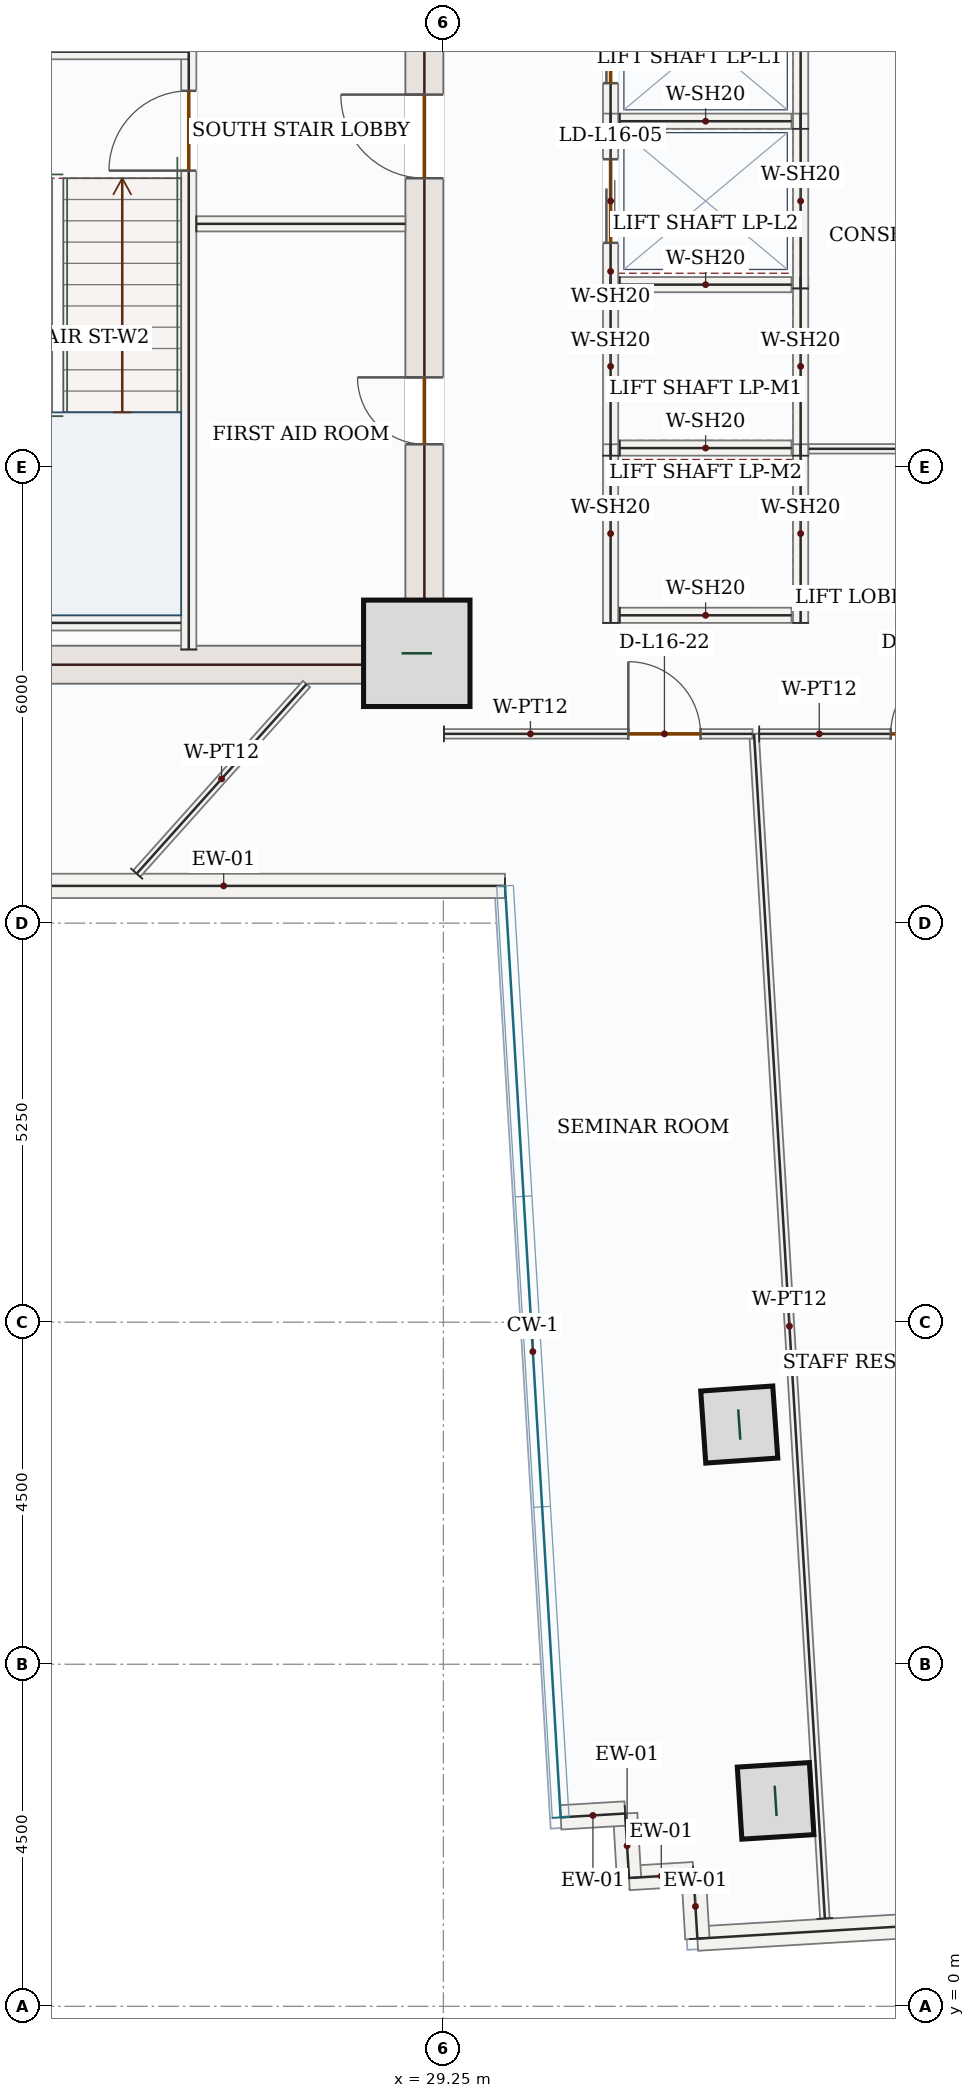
"""IFC4 building model, lengths in metres.
Left out: names, types, materials, properties, quantities, classifications, styles, units other than length and angle.
Written with IfcOpenShell. Run it as: python <this file> out.ifc"""

import sys

from ifc_helpers import new_model, si_unit, direction, frame, frame_2d, origin, origin_2d, place, context, subcontext, project, spatial, rectangle, hollow_rectangle, extrude, source, transform, mapped, element, fill, save


model = new_model("IFC4")
c1 = context("Model", 3, precision=1e-05, world=origin(), true_north=direction((0.0, 1.0)))
c2 = subcontext(c1, "Body", "Model", "MODEL_VIEW")
j1 = project(units=[si_unit("LENGTHUNIT", "METRE"), si_unit("PLANEANGLEUNIT", "RADIAN")], contexts=[c1])
p1 = place(None, origin())
s1 = spatial("IfcSite", under=j1, at=p1, CompositionType="ELEMENT")
p2 = place(p1, origin())
s2 = spatial("IfcBuilding", under=s1, at=p2, CompositionType="ELEMENT")
p3 = place(p2, frame((0.0, 0.0, 75.3)))
s3 = spatial("IfcBuildingStorey", under=s2, at=p3, CompositionType="ELEMENT", Elevation=75.3)
p4 = place(p3, frame((29.0, 17.4, 0.0), z_axis=(0.0, 0.0, 1.0), x_axis=(0.0, 1.0, 0.0)))
e1 = element("IfcWall", 1, at=p4, inside=s3, PredefinedType="SHEAR", context=c2, shape_type="SweptSolid", body=[
    extrude(rectangle(XDim=8.55, YDim=0.5, at=frame_2d((4.275, 0.0))), origin(), (0.0, 0.0, 1.0), 3.95),
])
p5 = place(p4, frame((6.65, 0.0, 0.0)))
e2 = element("IfcOpeningElement", 2, at=p5, cuts=e1, PredefinedType="OPENING", context=c2, shape_type="SweptSolid", body=[
    extrude(rectangle(XDim=1.1, YDim=2.2, at=frame_2d((0.55, 1.1))), frame((0.0, 0.26, 0.0), z_axis=(0.0, -1.0, 0.0), x_axis=(1.0, 0.0, 0.0)), (0.0, 0.0, 1.0), 0.52),
])
p6 = place(p4, frame((3.15, 0.0, 0.0)))
e3 = element("IfcOpeningElement", 3, at=p6, cuts=e1, PredefinedType="OPENING", context=c2, shape_type="SweptSolid", body=[
    extrude(rectangle(XDim=0.88, YDim=2.1, at=frame_2d((0.44, 1.05))), frame((0.0, 0.26, 0.0), z_axis=(0.0, -1.0, 0.0), x_axis=(1.0, 0.0, 0.0)), (0.0, 0.0, 1.0), 0.52),
])
m1 = source(origin(), c2, "Body", "SweptSolid", [
    extrude(rectangle(XDim=7.0, YDim=0.5, at=frame_2d((3.5, 0.0))), origin(), (0.0, 0.0, 1.0), 3.95),
])
p7 = place(p3, frame((21.75, 17.65, 0.0), z_axis=(0.0, 0.0, 1.0), x_axis=(1.0, 0.0, 0.0)))
e4 = element("IfcWall", 4, at=p7, inside=s3, PredefinedType="SHEAR", context=c2, shape_type="MappedRepresentation", body=[
    mapped(m1, transform((0.0, 0.0, 0.0), x_axis=(1.0, 0.0, 0.0), y_axis=(0.0, 1.0, 0.0), z_axis=(0.0, 0.0, 1.0), scale=1.0)),
])
m2 = source(origin(), c2, "Body", "SweptSolid", [
    extrude(rectangle(XDim=1.4, YDim=1.4, at=origin_2d()), origin(), (0.0, 0.0, 1.0), 4.2),
])
p8 = place(p3, frame((28.9, 17.8, 0.0), z_axis=(0.0, 0.0, 1.0), x_axis=(1.0, 0.0, 0.0)))
e5 = element("IfcColumn", 5, at=p8, inside=s3, PredefinedType="COLUMN", context=c2, shape_type="MappedRepresentation", body=[
    mapped(m2, transform((0.0, 0.0, 0.0), x_axis=(1.0, 0.0, 0.0), y_axis=(0.0, 1.0, 0.0), z_axis=(0.0, 0.0, 1.0), scale=1.0)),
])
m3 = source(origin(), c2, "Body", "SweptSolid", [
    extrude(hollow_rectangle(XDim=0.95, YDim=0.95, WallThickness=0.05, at=origin_2d()), origin(), (0.0, 0.0, 1.0), 4.2),
])
for number, where, z_axis, x_axis in (
    (6, (33.143, 7.654, 0.0), (0.0, 0.0, 1.0), (-0.07, 0.998, 0.0)),
    (7, (33.621, 2.703, 0.0), (0.0, 0.0, 1.0), (-0.063, 0.998, 0.0)),
):
    element("IfcColumn", number, at=place(p3, frame(where, z_axis=z_axis, x_axis=x_axis)), inside=s3, PredefinedType="COLUMN", context=c2, shape_type="MappedRepresentation", body=[
        mapped(m3, transform((0.0, 0.0, 0.0), x_axis=(1.0, 0.0, 0.0), y_axis=(0.0, 1.0, 0.0), z_axis=(0.0, 0.0, 1.0), scale=1.0)),
    ])
m4 = source(origin(), c2, "Body", "SweptSolid", [
    extrude(rectangle(XDim=9.92, YDim=0.32, at=frame_2d((4.96, 0.0))), origin(), (0.0, 0.0, 1.0), 3.95),
])
p9 = place(p3, frame((42.494, 1.482, 0.0), z_axis=(0.0, 0.0, 1.0), x_axis=(-0.998218942745, -0.059656871726, 0.0)))
e8 = element("IfcWall", 8, at=p9, inside=s3, PredefinedType="SOLIDWALL", context=c2, shape_type="MappedRepresentation", body=[
    mapped(m4, transform((0.0, 0.0, 0.0), x_axis=(1.0, 0.0, 0.0), y_axis=(0.0, 1.0, 0.0), z_axis=(0.0, 0.0, 1.0), scale=1.0)),
])
m5 = source(origin(), c2, "Body", "SweptSolid", [
    extrude(rectangle(XDim=0.85, YDim=0.32, at=frame_2d((0.425, 0.0))), origin(), (0.0, 0.0, 1.0), 3.95),
])
p10 = place(p3, frame((32.592, 0.89, 0.0), z_axis=(0.0, 0.0, 1.0), x_axis=(-0.059732049764, 0.998214447016, 0.0)))
e9 = element("IfcWall", 9, at=p10, inside=s3, PredefinedType="SOLIDWALL", context=c2, shape_type="MappedRepresentation", body=[
    mapped(m5, transform((0.0, 0.0, 0.0), x_axis=(1.0, 0.0, 0.0), y_axis=(0.0, 1.0, 0.0), z_axis=(0.0, 0.0, 1.0), scale=1.0)),
])
m6 = source(origin(), c2, "Body", "SweptSolid", [
    extrude(rectangle(XDim=0.85, YDim=0.32, at=frame_2d((0.425, 0.0))), origin(), (0.0, 0.0, 1.0), 3.95),
])
for number, where, z_axis, x_axis in (
    (10, (32.541, 1.739, 0.0), (0.0, 0.0, 1.0), (-0.998, -0.06, 0.0)),
    (11, (31.692, 1.688, 0.0), (0.0, 0.0, 1.0), (-0.06, 0.998, 0.0)),
    (12, (31.642, 2.536, 0.0), (0.0, 0.0, 1.0), (-0.998, -0.06, 0.0)),
):
    element("IfcWall", number, at=place(p3, frame(where, z_axis=z_axis, x_axis=x_axis)), inside=s3, PredefinedType="SOLIDWALL", context=c2, shape_type="MappedRepresentation", body=[
        mapped(m6, transform((0.0, 0.0, 0.0), x_axis=(1.0, 0.0, 0.0), y_axis=(0.0, 1.0, 0.0), z_axis=(0.0, 0.0, 1.0), scale=1.0)),
    ])
m7 = source(origin(), c2, "Body", "SweptSolid", [
    extrude(rectangle(XDim=7.403, YDim=0.32, at=frame_2d((3.701, 0.0))), origin(), (0.0, 0.0, 1.0), 3.95),
])
p11 = place(p3, frame((30.061, 14.74, 0.0), z_axis=(0.0, 0.0, 1.0), x_axis=(-1.0, 0.0, 0.0)))
e13 = element("IfcWall", 13, at=p11, inside=s3, PredefinedType="SOLIDWALL", context=c2, shape_type="MappedRepresentation", body=[
    mapped(m7, transform((0.0, 0.0, 0.0), x_axis=(1.0, 0.0, 0.0), y_axis=(0.0, 1.0, 0.0), z_axis=(0.0, 0.0, 1.0), scale=1.0)),
])
p12 = place(p3, frame((25.9, 17.85, 0.0), z_axis=(0.0, 0.0, 1.0), x_axis=(0.0, 1.0, 0.0)))
e14 = element("IfcWall", 14, at=p12, inside=s3, PredefinedType="SOLIDWALL", context=c2, shape_type="SweptSolid", body=[
    extrude(rectangle(XDim=8.0, YDim=0.2, at=frame_2d((4.0, 0.0))), origin(), (0.0, 0.0, 1.0), 3.95),
])
p13 = place(p12, frame((6.3, 0.0, 0.0)))
e15 = element("IfcOpeningElement", 15, at=p13, cuts=e14, PredefinedType="OPENING", context=c2, shape_type="SweptSolid", body=[
    extrude(rectangle(XDim=1.05, YDim=2.15, at=frame_2d((0.525, 1.075))), frame((0.0, 0.11, 0.0), z_axis=(0.0, -1.0, 0.0), x_axis=(1.0, 0.0, 0.0)), (0.0, 0.0, 1.0), 0.22),
])
m8 = source(origin(), c2, "Body", "SweptSolid", [
    extrude(rectangle(XDim=4.25, YDim=0.2, at=frame_2d((2.125, 0.0))), origin(), (0.0, 0.0, 1.0), 3.95),
])
p14 = place(p3, frame((21.65, 25.715, 0.0), z_axis=(0.0, 0.0, 1.0), x_axis=(1.0, 0.0, 0.0)))
e16 = element("IfcWall", 16, at=p14, inside=s3, PredefinedType="SOLIDWALL", context=c2, shape_type="MappedRepresentation", body=[
    mapped(m8, transform((0.0, 0.0, 0.0), x_axis=(1.0, 0.0, 0.0), y_axis=(0.0, 1.0, 0.0), z_axis=(0.0, 0.0, 1.0), scale=1.0)),
])
m9 = source(origin(), c2, "Body", "SweptSolid", [
    extrude(rectangle(XDim=3.25, YDim=0.2, at=frame_2d((1.625, 0.0))), origin(), (0.0, 0.0, 1.0), 3.95),
])
p15 = place(p3, frame((22.55, 18.2, 0.0), z_axis=(0.0, 0.0, 1.0), x_axis=(1.0, 0.0, 0.0)))
e17 = element("IfcWall", 17, at=p15, inside=s3, PredefinedType="SOLIDWALL", context=c2, shape_type="MappedRepresentation", body=[
    mapped(m9, transform((0.0, 0.0, 0.0), x_axis=(1.0, 0.0, 0.0), y_axis=(0.0, 1.0, 0.0), z_axis=(0.0, 0.0, 1.0), scale=1.0)),
])
m10 = source(origin(), c2, "Body", "SweptSolid", [
    extrude(rectangle(XDim=2.75, YDim=0.2, at=frame_2d((1.375, 0.0))), origin(), (0.0, 0.0, 1.0), 3.95),
])
p16 = place(p3, frame((26.0, 23.45, 0.0), z_axis=(0.0, 0.0, 1.0), x_axis=(1.0, 0.0, 0.0)))
e18 = element("IfcWall", 18, at=p16, inside=s3, PredefinedType="SOLIDWALL", context=c2, shape_type="MappedRepresentation", body=[
    mapped(m10, transform((0.0, 0.0, 0.0), x_axis=(1.0, 0.0, 0.0), y_axis=(0.0, 1.0, 0.0), z_axis=(0.0, 0.0, 1.0), scale=1.0)),
])
m11 = source(origin(), c2, "Body", "SweptSolid", [
    extrude(rectangle(XDim=2.35, YDim=0.2, at=frame_2d((1.175, 0.0))), origin(), (0.0, 0.0, 1.0), 3.95),
])
for number, where, z_axis, x_axis in (
    (19, (31.45, 20.4, 0.0), (0.0, 0.0, 1.0), (0.0, 1.0, 0.0)),
    (20, (33.95, 20.4, 0.0), (0.0, 0.0, 1.0), (0.0, 1.0, 0.0)),
):
    element("IfcWall", number, at=place(p3, frame(where, z_axis=z_axis, x_axis=x_axis)), inside=s3, PredefinedType="SOLIDWALL", context=c2, shape_type="MappedRepresentation", body=[
        mapped(m11, transform((0.0, 0.0, 0.0), x_axis=(1.0, 0.0, 0.0), y_axis=(0.0, 1.0, 0.0), z_axis=(0.0, 0.0, 1.0), scale=1.0)),
    ])
m12 = source(origin(), c2, "Body", "SweptSolid", [
    extrude(rectangle(XDim=2.26, YDim=0.2, at=frame_2d((1.13, 0.0))), origin(), (0.0, 0.0, 1.0), 3.95),
])
for number, where, z_axis, x_axis in (
    (21, (31.57, 20.5, 0.0), (0.0, 0.0, 1.0), (1.0, 0.0, 0.0)),
    (22, (31.57, 22.65, 0.0), (0.0, 0.0, 1.0), (1.0, 0.0, 0.0)),
):
    element("IfcWall", number, at=place(p3, frame(where, z_axis=z_axis, x_axis=x_axis)), inside=s3, PredefinedType="SOLIDWALL", context=c2, shape_type="MappedRepresentation", body=[
        mapped(m12, transform((0.0, 0.0, 0.0), x_axis=(1.0, 0.0, 0.0), y_axis=(0.0, 1.0, 0.0), z_axis=(0.0, 0.0, 1.0), scale=1.0)),
    ])
for number, where, z_axis, x_axis in (
    (23, (31.45, 18.2, 0.0), (0.0, 0.0, 1.0), (0.0, 1.0, 0.0)),
    (24, (33.95, 18.2, 0.0), (0.0, 0.0, 1.0), (0.0, 1.0, 0.0)),
):
    element("IfcWall", number, at=place(p3, frame(where, z_axis=z_axis, x_axis=x_axis)), inside=s3, PredefinedType="SOLIDWALL", context=c2, shape_type="MappedRepresentation", body=[
        mapped(m11, transform((0.0, 0.0, 0.0), x_axis=(1.0, 0.0, 0.0), y_axis=(0.0, 1.0, 0.0), z_axis=(0.0, 0.0, 1.0), scale=1.0)),
    ])
p17 = place(p3, frame((31.57, 18.3, 0.0), z_axis=(0.0, 0.0, 1.0), x_axis=(1.0, 0.0, 0.0)))
e25 = element("IfcWall", 25, at=p17, inside=s3, PredefinedType="SOLIDWALL", context=c2, shape_type="MappedRepresentation", body=[
    mapped(m12, transform((0.0, 0.0, 0.0), x_axis=(1.0, 0.0, 0.0), y_axis=(0.0, 1.0, 0.0), z_axis=(0.0, 0.0, 1.0), scale=1.0)),
])
p18 = place(p3, frame((31.45, 24.7, 0.0), z_axis=(0.0, 0.0, 1.0), x_axis=(0.0, 1.0, 0.0)))
e26 = element("IfcWall", 26, at=p18, inside=s3, PredefinedType="SOLIDWALL", context=c2, shape_type="SweptSolid", body=[
    extrude(rectangle(XDim=2.3, YDim=0.2, at=frame_2d((1.15, 0.0))), origin(), (0.0, 0.0, 1.0), 3.95),
])
p19 = place(p18, frame((0.6, 0.0, 0.0)))
e27 = element("IfcOpeningElement", 27, at=p19, cuts=e26, PredefinedType="OPENING", context=c2, shape_type="SweptSolid", body=[
    extrude(rectangle(XDim=1.1, YDim=2.15, at=frame_2d((0.55, 1.075))), frame((0.0, 0.11, 0.0), z_axis=(0.0, -1.0, 0.0), x_axis=(1.0, 0.0, 0.0)), (0.0, 0.0, 1.0), 0.22),
])
m13 = source(origin(), c2, "Body", "SweptSolid", [
    extrude(rectangle(XDim=2.3, YDim=0.2, at=frame_2d((1.15, 0.0))), origin(), (0.0, 0.0, 1.0), 3.95),
])
p20 = place(p3, frame((33.95, 24.7, 0.0), z_axis=(0.0, 0.0, 1.0), x_axis=(0.0, 1.0, 0.0)))
e28 = element("IfcWall", 28, at=p20, inside=s3, PredefinedType="SOLIDWALL", context=c2, shape_type="MappedRepresentation", body=[
    mapped(m13, transform((0.0, 0.0, 0.0), x_axis=(1.0, 0.0, 0.0), y_axis=(0.0, 1.0, 0.0), z_axis=(0.0, 0.0, 1.0), scale=1.0)),
])
p21 = place(p3, frame((31.57, 24.8, 0.0), z_axis=(0.0, 0.0, 1.0), x_axis=(1.0, 0.0, 0.0)))
e29 = element("IfcWall", 29, at=p21, inside=s3, PredefinedType="SOLIDWALL", context=c2, shape_type="MappedRepresentation", body=[
    mapped(m12, transform((0.0, 0.0, 0.0), x_axis=(1.0, 0.0, 0.0), y_axis=(0.0, 1.0, 0.0), z_axis=(0.0, 0.0, 1.0), scale=1.0)),
])
p22 = place(p3, frame((31.45, 22.6, 0.0), z_axis=(0.0, 0.0, 1.0), x_axis=(0.0, 1.0, 0.0)))
e30 = element("IfcWall", 30, at=p22, inside=s3, PredefinedType="SOLIDWALL", context=c2, shape_type="SweptSolid", body=[
    extrude(rectangle(XDim=2.3, YDim=0.2, at=frame_2d((1.15, 0.0))), origin(), (0.0, 0.0, 1.0), 3.95),
])
p23 = place(p22, frame((0.6, 0.0, 0.0)))
e31 = element("IfcOpeningElement", 31, at=p23, cuts=e30, PredefinedType="OPENING", context=c2, shape_type="SweptSolid", body=[
    extrude(rectangle(XDim=1.1, YDim=2.15, at=frame_2d((0.55, 1.075))), frame((0.0, 0.11, 0.0), z_axis=(0.0, -1.0, 0.0), x_axis=(1.0, 0.0, 0.0)), (0.0, 0.0, 1.0), 0.22),
])
m14 = source(origin(), c2, "Body", "SweptSolid", [
    extrude(rectangle(XDim=2.3, YDim=0.2, at=frame_2d((1.15, 0.0))), origin(), (0.0, 0.0, 1.0), 3.95),
])
p24 = place(p3, frame((33.95, 22.6, 0.0), z_axis=(0.0, 0.0, 1.0), x_axis=(0.0, 1.0, 0.0)))
e32 = element("IfcWall", 32, at=p24, inside=s3, PredefinedType="SOLIDWALL", context=c2, shape_type="MappedRepresentation", body=[
    mapped(m14, transform((0.0, 0.0, 0.0), x_axis=(1.0, 0.0, 0.0), y_axis=(0.0, 1.0, 0.0), z_axis=(0.0, 0.0, 1.0), scale=1.0)),
])
m15 = source(origin(), c2, "Body", "SweptSolid", [
    extrude(rectangle(XDim=3.89, YDim=0.125, at=frame_2d((1.945, 0.0))), origin(), (0.0, 0.0, 1.0), 3.95),
])
p25 = place(p3, frame((37.945, 20.49, 0.0), z_axis=(0.0, 0.0, 1.0), x_axis=(-1.0, 0.0, 0.0)))
e33 = element("IfcWall", 33, at=p25, inside=s3, PredefinedType="PARTITIONING", context=c2, shape_type="MappedRepresentation", body=[
    mapped(m15, transform((0.0, 0.0, 0.0), x_axis=(1.0, 0.0, 0.0), y_axis=(0.0, 1.0, 0.0), z_axis=(0.0, 0.0, 1.0), scale=1.0)),
])
m16 = source(origin(), c2, "Body", "SweptSolid", [
    extrude(rectangle(XDim=15.612, YDim=0.125, at=frame_2d((7.806, 0.0))), origin(), (0.0, 0.0, 1.0), 3.95),
])
p26 = place(p3, frame((34.269, 1.156, 0.0), z_axis=(0.0, 0.0, 1.0), x_axis=(-0.059658872533, 0.998218823169, 0.0)))
e34 = element("IfcWall", 34, at=p26, inside=s3, PredefinedType="PARTITIONING", context=c2, shape_type="MappedRepresentation", body=[
    mapped(m16, transform((0.0, 0.0, 0.0), x_axis=(1.0, 0.0, 0.0), y_axis=(0.0, 1.0, 0.0), z_axis=(0.0, 0.0, 1.0), scale=1.0)),
])
p27 = place(p3, frame((33.405, 16.74, 0.0), z_axis=(0.0, 0.0, 1.0), x_axis=(1.0, 0.0, 0.0)))
e35 = element("IfcWall", 35, at=p27, inside=s3, PredefinedType="PARTITIONING", context=c2, shape_type="SweptSolid", body=[
    extrude(rectangle(XDim=3.168, YDim=0.125, at=frame_2d((1.584, 0.0))), origin(), (0.0, 0.0, 1.0), 3.95),
])
p28 = place(p27, frame((1.73, 0.0, 0.0)))
e36 = element("IfcOpeningElement", 36, at=p28, cuts=e35, PredefinedType="OPENING", context=c2, shape_type="SweptSolid", body=[
    extrude(rectangle(XDim=0.95, YDim=2.15, at=frame_2d((0.475, 1.075))), frame((0.0, 0.073, 0.0), z_axis=(0.0, -1.0, 0.0), x_axis=(1.0, 0.0, 0.0)), (0.0, 0.0, 1.0), 0.145),
])
p29 = place(p3, frame((29.258, 16.74, 0.0), z_axis=(0.0, 0.0, 1.0), x_axis=(0.999999998192, -6.0135907e-05, 0.0)))
e37 = element("IfcWall", 37, at=p29, inside=s3, PredefinedType="PARTITIONING", context=c2, shape_type="SweptSolid", body=[
    extrude(rectangle(XDim=4.06, YDim=0.125, at=frame_2d((2.03, 0.0))), origin(), (0.0, 0.0, 1.0), 3.95),
])
p30 = place(p29, frame((2.426, 0.0, 0.0)))
e38 = element("IfcOpeningElement", 38, at=p30, cuts=e37, PredefinedType="OPENING", context=c2, shape_type="SweptSolid", body=[
    extrude(rectangle(XDim=0.95, YDim=2.15, at=frame_2d((0.475, 1.075))), frame((0.0, 0.073, 0.0), z_axis=(0.0, -1.0, 0.0), x_axis=(1.0, 0.0, 0.0)), (0.0, 0.0, 1.0), 0.145),
])
m17 = source(origin(), c2, "Body", "SweptSolid", [
    extrude(rectangle(XDim=3.348, YDim=0.125, at=frame_2d((1.674, 0.0))), origin(), (0.0, 0.0, 1.0), 3.95),
])
p31 = place(p3, frame((25.215, 14.901, 0.0), z_axis=(0.0, 0.0, 1.0), x_axis=(0.667206176518, 0.74487308853, 0.0)))
e39 = element("IfcWall", 39, at=p31, inside=s3, PredefinedType="PARTITIONING", context=c2, shape_type="MappedRepresentation", body=[
    mapped(m17, transform((0.0, 0.0, 0.0), x_axis=(1.0, 0.0, 0.0), y_axis=(0.0, 1.0, 0.0), z_axis=(0.0, 0.0, 1.0), scale=1.0)),
])
m18 = source(origin(), c2, "Body", "SweptSolid", [
    extrude(rectangle(XDim=1.05, YDim=2.15, at=frame_2d((0.525, 1.075))), frame((0.0, 0.025, 0.0), z_axis=(0.0, -1.0, 0.0), x_axis=(1.0, 0.0, 0.0)), (0.0, 0.0, 1.0), 0.05),
])
p32 = place(p13, origin())
e40 = element("IfcDoor", 40, at=p32, inside=s3, OperationType="SINGLE_SWING_LEFT", PredefinedType="DOOR", context=c2, shape_type="MappedRepresentation", body=[
    mapped(m18, transform((0.0, 0.0, 0.0), x_axis=(1.0, 0.0, 0.0), y_axis=(0.0, 1.0, 0.0), z_axis=(0.0, 0.0, 1.0), scale=1.0)),
])
fill(e15, e40)
m19 = source(origin(), c2, "Body", "SweptSolid", [
    extrude(rectangle(XDim=1.1, YDim=2.2, at=frame_2d((0.55, 1.1))), frame((0.0, 0.025, 0.0), z_axis=(0.0, -1.0, 0.0), x_axis=(1.0, 0.0, 0.0)), (0.0, 0.0, 1.0), 0.05),
])
p33 = place(p5, origin())
e41 = element("IfcDoor", 41, at=p33, inside=s3, OperationType="SINGLE_SWING_RIGHT", PredefinedType="DOOR", context=c2, shape_type="MappedRepresentation", body=[
    mapped(m19, transform((0.0, 0.0, 0.0), x_axis=(1.0, 0.0, 0.0), y_axis=(0.0, 1.0, 0.0), z_axis=(0.0, 0.0, 1.0), scale=1.0)),
])
fill(e2, e41)
m20 = source(origin(), c2, "Body", "SweptSolid", [
    extrude(rectangle(XDim=0.88, YDim=2.1, at=frame_2d((0.44, 1.05))), frame((0.0, 0.025, 0.0), z_axis=(0.0, -1.0, 0.0), x_axis=(1.0, 0.0, 0.0)), (0.0, 0.0, 1.0), 0.05),
])
p34 = place(p6, origin())
e42 = element("IfcDoor", 42, at=p34, inside=s3, OperationType="SINGLE_SWING_RIGHT", PredefinedType="DOOR", context=c2, shape_type="MappedRepresentation", body=[
    mapped(m20, transform((0.0, 0.0, 0.0), x_axis=(1.0, 0.0, 0.0), y_axis=(0.0, 1.0, 0.0), z_axis=(0.0, 0.0, 1.0), scale=1.0)),
])
fill(e3, e42)
m21 = source(origin(), c2, "Body", "SweptSolid", [
    extrude(rectangle(XDim=1.1, YDim=2.15, at=frame_2d((0.55, 1.075))), frame((0.0, 0.025, 0.0), z_axis=(0.0, -1.0, 0.0), x_axis=(1.0, 0.0, 0.0)), (0.0, 0.0, 1.0), 0.05),
])
p35 = place(p19, origin())
e43 = element("IfcDoor", 43, at=p35, inside=s3, OperationType="DOUBLE_DOOR_SLIDING", PredefinedType="DOOR", context=c2, shape_type="MappedRepresentation", body=[
    mapped(m21, transform((0.0, 0.0, 0.0), x_axis=(1.0, 0.0, 0.0), y_axis=(0.0, 1.0, 0.0), z_axis=(0.0, 0.0, 1.0), scale=1.0)),
])
fill(e27, e43)
p36 = place(p23, origin())
e44 = element("IfcDoor", 44, at=p36, inside=s3, OperationType="DOUBLE_DOOR_SLIDING", PredefinedType="DOOR", context=c2, shape_type="MappedRepresentation", body=[
    mapped(m21, transform((0.0, 0.0, 0.0), x_axis=(1.0, 0.0, 0.0), y_axis=(0.0, 1.0, 0.0), z_axis=(0.0, 0.0, 1.0), scale=1.0)),
])
fill(e31, e44)
m22 = source(origin(), c2, "Body", "SweptSolid", [
    extrude(rectangle(XDim=0.95, YDim=2.15, at=frame_2d((0.475, 1.075))), frame((0.0, 0.025, 0.0), z_axis=(0.0, -1.0, 0.0), x_axis=(1.0, 0.0, 0.0)), (0.0, 0.0, 1.0), 0.05),
])
p37 = place(p30, origin())
e45 = element("IfcDoor", 45, at=p37, inside=s3, OperationType="SINGLE_SWING_LEFT", PredefinedType="DOOR", context=c2, shape_type="MappedRepresentation", body=[
    mapped(m22, transform((0.0, 0.0, 0.0), x_axis=(1.0, 0.0, 0.0), y_axis=(0.0, 1.0, 0.0), z_axis=(0.0, 0.0, 1.0), scale=1.0)),
])
fill(e38, e45)
p38 = place(p28, origin())
e46 = element("IfcDoor", 46, at=p38, inside=s3, OperationType="SINGLE_SWING_RIGHT", PredefinedType="DOOR", context=c2, shape_type="MappedRepresentation", body=[
    mapped(m22, transform((0.0, 0.0, 0.0), x_axis=(1.0, 0.0, 0.0), y_axis=(0.0, 1.0, 0.0), z_axis=(0.0, 0.0, 1.0), scale=1.0)),
])
fill(e36, e46)
save(model, sys.argv[1])
